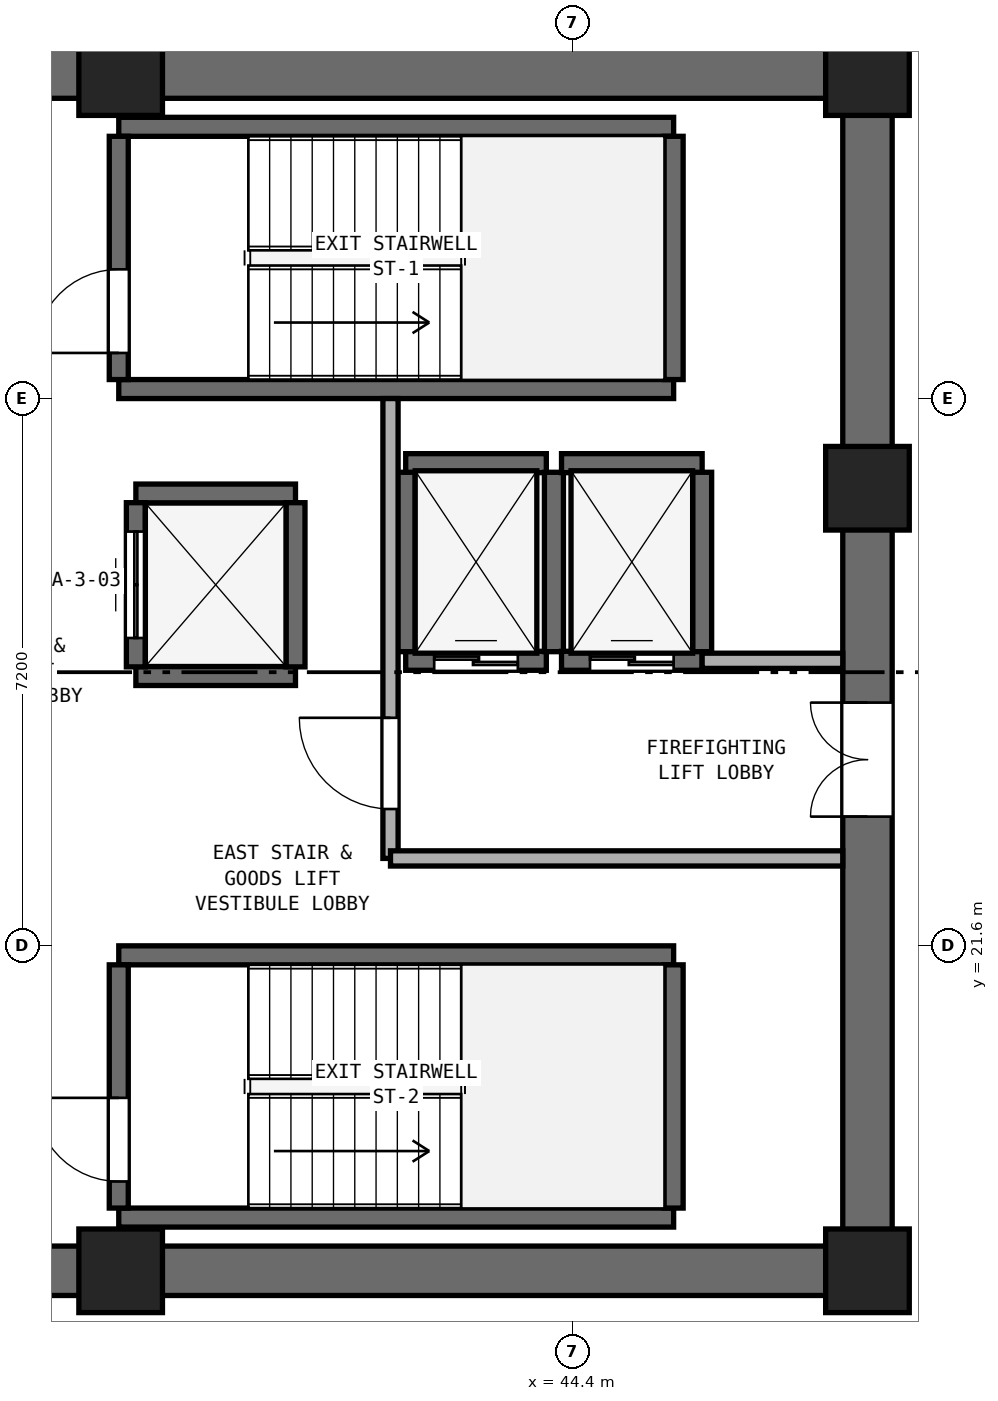
"""IFC4 building model, lengths in metres.
Left out: names, types, materials, properties, quantities, classifications, styles, units other than length and angle.
Written with IfcOpenShell. Run it as: python <this file> out.ifc"""

import sys

from ifc_helpers import new_model, si_unit, direction, frame, frame_2d, origin, origin_2d, place, context, subcontext, project, spatial, rectangle, extrude, element, fill, save


model = new_model("IFC4")
c1 = context("Model", 3, precision=1e-05, world=origin(), true_north=direction((0.0, 1.0)))
c2 = subcontext(c1, "Body", "Model", "MODEL_VIEW")
j1 = project(units=[si_unit("LENGTHUNIT", "METRE"), si_unit("PLANEANGLEUNIT", "RADIAN")], contexts=[c1])
p1 = place(None, origin())
s1 = spatial("IfcSite", under=j1, at=p1, CompositionType="ELEMENT")
p2 = place(p1, origin())
s2 = spatial("IfcBuilding", under=s1, at=p2, CompositionType="ELEMENT")
p3 = place(p2, frame((0.0, 0.0, 51.6)))
s3 = spatial("IfcBuildingStorey", under=s2, at=p3, CompositionType="ELEMENT", Elevation=51.6)
for number, where, z_axis, x_axis in (
    (1, (25.4, 17.325, 0.0), (0.0, 0.0, 1.0), (1.0, 0.0, 0.0)),
    (2, (25.4, 33.075, 0.0), (0.0, 0.0, 1.0), (1.0, 0.0, 0.0)),
):
    element("IfcWall", number, at=place(p3, frame(where, z_axis=z_axis, x_axis=x_axis)), inside=s3, PredefinedType="SHEAR", context=c2, shape_type="SweptSolid", body=[
        extrude(rectangle(XDim=23.2, YDim=0.65, at=frame_2d((11.6, 0.0))), origin(), (0.0, 0.0, 1.0), 3.525),
    ])
p4 = place(p3, frame((48.275, 17.65, 0.0), z_axis=(0.0, 0.0, 1.0), x_axis=(0.0, 1.0, 0.0)))
e3 = element("IfcWall", 3, at=p4, inside=s3, PredefinedType="SHEAR", context=c2, shape_type="SweptSolid", body=[
    extrude(rectangle(XDim=15.1, YDim=0.65, at=frame_2d((7.55, 0.0))), origin(), (0.0, 0.0, 1.0), 3.525),
])
p5 = place(p4, frame((5.65, 0.0, 0.0)))
e4 = element("IfcOpeningElement", 4, at=p5, cuts=e3, PredefinedType="OPENING", context=c2, shape_type="SweptSolid", body=[
    extrude(rectangle(XDim=1.5, YDim=2.15, at=frame_2d((0.75, 1.075))), frame((0.0, 0.335, 0.0), z_axis=(0.0, -1.0, 0.0), x_axis=(1.0, 0.0, 0.0)), (0.0, 0.0, 1.0), 0.67),
])
for number, where, z_axis, x_axis in (
    (5, (38.45, 17.325, 0.0), (0.0, 0.0, 1.0), (1.0, 0.0, 0.0)),
    (6, (48.275, 17.325, 0.0), (0.0, 0.0, 1.0), (1.0, 0.0, 0.0)),
    (7, (48.275, 27.62, 0.0), (0.0, 0.0, 1.0), (1.0, 0.0, 0.0)),
    (8, (48.275, 33.075, 0.0), (0.0, 0.0, 1.0), (1.0, 0.0, 0.0)),
    (9, (38.45, 33.075, 0.0), (0.0, 0.0, 1.0), (1.0, 0.0, 0.0)),
):
    element("IfcColumn", number, at=place(p3, frame(where, z_axis=z_axis, x_axis=x_axis)), inside=s3, PredefinedType="PILASTER", context=c2, shape_type="SweptSolid", body=[
        extrude(rectangle(XDim=1.1, YDim=1.1, at=origin_2d()), origin(), (0.0, 0.0, 1.0), 3.8),
    ])
for number, where, z_axis, x_axis in (
    (10, (38.425, 28.925, 0.0), (0.0, 0.0, 1.0), (1.0, 0.0, 0.0)),
    (11, (38.425, 32.375, 0.0), (0.0, 0.0, 1.0), (1.0, 0.0, 0.0)),
):
    element("IfcWall", number, at=place(p3, frame(where, z_axis=z_axis, x_axis=x_axis)), inside=s3, PredefinedType="SHEAR", context=c2, shape_type="SweptSolid", body=[
        extrude(rectangle(XDim=7.3, YDim=0.25, at=frame_2d((3.65, 0.0))), origin(), (0.0, 0.0, 1.0), 3.525),
    ])
p6 = place(p3, frame((38.425, 29.05, 0.0), z_axis=(0.0, 0.0, 1.0), x_axis=(0.0, 1.0, 0.0)))
e12 = element("IfcWall", 12, at=p6, inside=s3, PredefinedType="SHEAR", context=c2, shape_type="SweptSolid", body=[
    extrude(rectangle(XDim=3.2, YDim=0.25, at=frame_2d((1.6, 0.0))), origin(), (0.0, 0.0, 1.0), 3.525),
])
p7 = place(p6, frame((0.35, 0.0, 0.0)))
e13 = element("IfcOpeningElement", 13, at=p7, cuts=e12, PredefinedType="OPENING", context=c2, shape_type="SweptSolid", body=[
    extrude(rectangle(XDim=1.1, YDim=2.15, at=frame_2d((0.55, 1.075))), frame((0.0, 0.135, 0.0), z_axis=(0.0, -1.0, 0.0), x_axis=(1.0, 0.0, 0.0)), (0.0, 0.0, 1.0), 0.27),
])
p8 = place(p3, frame((45.725, 29.05, 0.0), z_axis=(0.0, 0.0, 1.0), x_axis=(0.0, 1.0, 0.0)))
e14 = element("IfcWall", 14, at=p8, inside=s3, PredefinedType="SHEAR", context=c2, shape_type="SweptSolid", body=[
    extrude(rectangle(XDim=3.2, YDim=0.25, at=frame_2d((1.6, 0.0))), origin(), (0.0, 0.0, 1.0), 3.525),
])
for number, where, z_axis, x_axis in (
    (15, (38.425, 18.025, 0.0), (0.0, 0.0, 1.0), (1.0, 0.0, 0.0)),
    (16, (38.425, 21.475, 0.0), (0.0, 0.0, 1.0), (1.0, 0.0, 0.0)),
):
    element("IfcWall", number, at=place(p3, frame(where, z_axis=z_axis, x_axis=x_axis)), inside=s3, PredefinedType="SHEAR", context=c2, shape_type="SweptSolid", body=[
        extrude(rectangle(XDim=7.3, YDim=0.25, at=frame_2d((3.65, 0.0))), origin(), (0.0, 0.0, 1.0), 3.525),
    ])
p9 = place(p3, frame((38.425, 18.15, 0.0), z_axis=(0.0, 0.0, 1.0), x_axis=(0.0, 1.0, 0.0)))
e17 = element("IfcWall", 17, at=p9, inside=s3, PredefinedType="SHEAR", context=c2, shape_type="SweptSolid", body=[
    extrude(rectangle(XDim=3.2, YDim=0.25, at=frame_2d((1.6, 0.0))), origin(), (0.0, 0.0, 1.0), 3.525),
])
p10 = place(p9, frame((0.35, 0.0, 0.0)))
e18 = element("IfcOpeningElement", 18, at=p10, cuts=e17, PredefinedType="OPENING", context=c2, shape_type="SweptSolid", body=[
    extrude(rectangle(XDim=1.1, YDim=2.15, at=frame_2d((0.55, 1.075))), frame((0.0, 0.135, 0.0), z_axis=(0.0, -1.0, 0.0), x_axis=(1.0, 0.0, 0.0)), (0.0, 0.0, 1.0), 0.27),
])
p11 = place(p3, frame((45.725, 18.15, 0.0), z_axis=(0.0, 0.0, 1.0), x_axis=(0.0, 1.0, 0.0)))
e19 = element("IfcWall", 19, at=p11, inside=s3, PredefinedType="SHEAR", context=c2, shape_type="SweptSolid", body=[
    extrude(rectangle(XDim=3.2, YDim=0.25, at=frame_2d((1.6, 0.0))), origin(), (0.0, 0.0, 1.0), 3.525),
])
p12 = place(p3, frame((42.2, 25.35, 0.0), z_axis=(0.0, 0.0, 1.0), x_axis=(1.0, 0.0, 0.0)))
e20 = element("IfcWall", 20, at=p12, inside=s3, PredefinedType="SHEAR", context=c2, shape_type="SweptSolid", body=[
    extrude(rectangle(XDim=1.85, YDim=0.25, at=frame_2d((0.925, 0.0))), origin(), (0.0, 0.0, 1.0), 3.525),
])
p13 = place(p12, frame((0.375, 0.0, 0.0)))
e21 = element("IfcOpeningElement", 21, at=p13, cuts=e20, PredefinedType="OPENING", context=c2, shape_type="SweptSolid", body=[
    extrude(rectangle(XDim=1.1, YDim=2.15, at=frame_2d((0.55, 1.075))), frame((0.0, 0.135, 0.0), z_axis=(0.0, -1.0, 0.0), x_axis=(1.0, 0.0, 0.0)), (0.0, 0.0, 1.0), 0.27),
])
p14 = place(p3, frame((42.2, 27.95, 0.0), z_axis=(0.0, 0.0, 1.0), x_axis=(1.0, 0.0, 0.0)))
e22 = element("IfcWall", 22, at=p14, inside=s3, PredefinedType="SHEAR", context=c2, shape_type="SweptSolid", body=[
    extrude(rectangle(XDim=1.85, YDim=0.25, at=frame_2d((0.925, 0.0))), origin(), (0.0, 0.0, 1.0), 3.525),
])
for number, where, z_axis, x_axis in (
    (23, (42.2, 25.47, 0.0), (0.0, 0.0, 1.0), (0.0, 1.0, 0.0)),
    (24, (44.15, 25.47, 0.0), (0.0, 0.0, 1.0), (0.0, 1.0, 0.0)),
):
    element("IfcWall", number, at=place(p3, frame(where, z_axis=z_axis, x_axis=x_axis)), inside=s3, PredefinedType="SHEAR", context=c2, shape_type="SweptSolid", body=[
        extrude(rectangle(XDim=2.36, YDim=0.25, at=frame_2d((1.18, 0.0))), origin(), (0.0, 0.0, 1.0), 3.525),
    ])
p15 = place(p3, frame((44.25, 25.35, 0.0), z_axis=(0.0, 0.0, 1.0), x_axis=(1.0, 0.0, 0.0)))
e25 = element("IfcWall", 25, at=p15, inside=s3, PredefinedType="SHEAR", context=c2, shape_type="SweptSolid", body=[
    extrude(rectangle(XDim=1.85, YDim=0.25, at=frame_2d((0.925, 0.0))), origin(), (0.0, 0.0, 1.0), 3.525),
])
p16 = place(p15, frame((0.375, 0.0, 0.0)))
e26 = element("IfcOpeningElement", 26, at=p16, cuts=e25, PredefinedType="OPENING", context=c2, shape_type="SweptSolid", body=[
    extrude(rectangle(XDim=1.1, YDim=2.15, at=frame_2d((0.55, 1.075))), frame((0.0, 0.135, 0.0), z_axis=(0.0, -1.0, 0.0), x_axis=(1.0, 0.0, 0.0)), (0.0, 0.0, 1.0), 0.27),
])
p17 = place(p3, frame((44.25, 27.95, 0.0), z_axis=(0.0, 0.0, 1.0), x_axis=(1.0, 0.0, 0.0)))
e27 = element("IfcWall", 27, at=p17, inside=s3, PredefinedType="SHEAR", context=c2, shape_type="SweptSolid", body=[
    extrude(rectangle(XDim=1.85, YDim=0.25, at=frame_2d((0.925, 0.0))), origin(), (0.0, 0.0, 1.0), 3.525),
])
p18 = place(p3, frame((46.1, 25.47, 0.0), z_axis=(0.0, 0.0, 1.0), x_axis=(0.0, 1.0, 0.0)))
e28 = element("IfcWall", 28, at=p18, inside=s3, PredefinedType="SHEAR", context=c2, shape_type="SweptSolid", body=[
    extrude(rectangle(XDim=2.36, YDim=0.25, at=frame_2d((1.18, 0.0))), origin(), (0.0, 0.0, 1.0), 3.525),
])
for number, where, z_axis, x_axis in (
    (29, (38.65, 25.15, 0.0), (0.0, 0.0, 1.0), (1.0, 0.0, 0.0)),
    (30, (38.65, 27.55, 0.0), (0.0, 0.0, 1.0), (1.0, 0.0, 0.0)),
):
    element("IfcWall", number, at=place(p3, frame(where, z_axis=z_axis, x_axis=x_axis)), inside=s3, PredefinedType="SHEAR", context=c2, shape_type="SweptSolid", body=[
        extrude(rectangle(XDim=2.1, YDim=0.25, at=frame_2d((1.05, 0.0))), origin(), (0.0, 0.0, 1.0), 3.525),
    ])
p19 = place(p3, frame((38.65, 25.27, 0.0), z_axis=(0.0, 0.0, 1.0), x_axis=(0.0, 1.0, 0.0)))
e31 = element("IfcWall", 31, at=p19, inside=s3, PredefinedType="SHEAR", context=c2, shape_type="SweptSolid", body=[
    extrude(rectangle(XDim=2.16, YDim=0.25, at=frame_2d((1.08, 0.0))), origin(), (0.0, 0.0, 1.0), 3.525),
])
p20 = place(p19, frame((0.38, 0.0, 0.0)))
e32 = element("IfcOpeningElement", 32, at=p20, cuts=e31, PredefinedType="OPENING", context=c2, shape_type="SweptSolid", body=[
    extrude(rectangle(XDim=1.4, YDim=2.2, at=frame_2d((0.7, 1.1))), frame((0.0, 0.135, 0.0), z_axis=(0.0, -1.0, 0.0), x_axis=(1.0, 0.0, 0.0)), (0.0, 0.0, 1.0), 0.27),
])
p21 = place(p3, frame((40.75, 25.27, 0.0), z_axis=(0.0, 0.0, 1.0), x_axis=(0.0, 1.0, 0.0)))
e33 = element("IfcWall", 33, at=p21, inside=s3, PredefinedType="SHEAR", context=c2, shape_type="SweptSolid", body=[
    extrude(rectangle(XDim=2.16, YDim=0.25, at=frame_2d((1.08, 0.0))), origin(), (0.0, 0.0, 1.0), 3.525),
])
p22 = place(p3, frame((42.0, 22.75, 0.0), z_axis=(0.0, 0.0, 1.0), x_axis=(0.0, 1.0, 0.0)))
e34 = element("IfcWall", 34, at=p22, inside=s3, PredefinedType="SOLIDWALL", context=c2, shape_type="SweptSolid", body=[
    extrude(rectangle(XDim=6.05, YDim=0.2, at=frame_2d((3.025, 0.0))), origin(), (0.0, 0.0, 1.0), 3.525),
])
p23 = place(p22, frame((0.65, 0.0, 0.0)))
e35 = element("IfcOpeningElement", 35, at=p23, cuts=e34, PredefinedType="OPENING", context=c2, shape_type="SweptSolid", body=[
    extrude(rectangle(XDim=1.2, YDim=2.15, at=frame_2d((0.6, 1.075))), frame((0.0, 0.11, 0.0), z_axis=(0.0, -1.0, 0.0), x_axis=(1.0, 0.0, 0.0)), (0.0, 0.0, 1.0), 0.22),
])
p24 = place(p3, frame((42.0, 22.75, 0.0), z_axis=(0.0, 0.0, 1.0), x_axis=(1.0, 0.0, 0.0)))
e36 = element("IfcWall", 36, at=p24, inside=s3, PredefinedType="SOLIDWALL", context=c2, shape_type="SweptSolid", body=[
    extrude(rectangle(XDim=5.95, YDim=0.2, at=frame_2d((2.975, 0.0))), origin(), (0.0, 0.0, 1.0), 3.525),
])
p25 = place(p3, frame((46.1, 25.35, 0.0), z_axis=(0.0, 0.0, 1.0), x_axis=(1.0, 0.0, 0.0)))
e37 = element("IfcWall", 37, at=p25, inside=s3, PredefinedType="SOLIDWALL", context=c2, shape_type="SweptSolid", body=[
    extrude(rectangle(XDim=1.85, YDim=0.2, at=frame_2d((0.925, 0.0))), origin(), (0.0, 0.0, 1.0), 3.525),
])
p26 = place(p7, origin())
e38 = element("IfcDoor", 38, at=p26, inside=s3, OperationType="SINGLE_SWING_LEFT", PredefinedType="DOOR", context=c2, shape_type="SweptSolid", body=[
    extrude(rectangle(XDim=1.1, YDim=2.15, at=frame_2d((0.55, 1.075))), frame((0.0, 0.025, 0.0), z_axis=(0.0, -1.0, 0.0), x_axis=(1.0, 0.0, 0.0)), (0.0, 0.0, 1.0), 0.05),
])
fill(e13, e38)
p27 = place(p10, origin())
e39 = element("IfcDoor", 39, at=p27, inside=s3, OperationType="SINGLE_SWING_RIGHT", PredefinedType="DOOR", context=c2, shape_type="SweptSolid", body=[
    extrude(rectangle(XDim=1.1, YDim=2.15, at=frame_2d((0.55, 1.075))), frame((0.0, 0.025, 0.0), z_axis=(0.0, -1.0, 0.0), x_axis=(1.0, 0.0, 0.0)), (0.0, 0.0, 1.0), 0.05),
])
fill(e18, e39)
p28 = place(p13, origin())
e40 = element("IfcDoor", 40, at=p28, inside=s3, OperationType="DOUBLE_DOOR_SLIDING", PredefinedType="DOOR", context=c2, shape_type="SweptSolid", body=[
    extrude(rectangle(XDim=1.1, YDim=2.15, at=frame_2d((0.55, 1.075))), frame((0.0, 0.025, 0.0), z_axis=(0.0, -1.0, 0.0), x_axis=(1.0, 0.0, 0.0)), (0.0, 0.0, 1.0), 0.05),
])
fill(e21, e40)
p29 = place(p16, origin())
e41 = element("IfcDoor", 41, at=p29, inside=s3, OperationType="DOUBLE_DOOR_SLIDING", PredefinedType="DOOR", context=c2, shape_type="SweptSolid", body=[
    extrude(rectangle(XDim=1.1, YDim=2.15, at=frame_2d((0.55, 1.075))), frame((0.0, 0.025, 0.0), z_axis=(0.0, -1.0, 0.0), x_axis=(1.0, 0.0, 0.0)), (0.0, 0.0, 1.0), 0.05),
])
fill(e26, e41)
p30 = place(p20, origin())
e42 = element("IfcDoor", 42, at=p30, inside=s3, OperationType="DOUBLE_DOOR_SLIDING", PredefinedType="DOOR", context=c2, shape_type="SweptSolid", body=[
    extrude(rectangle(XDim=1.4, YDim=2.2, at=frame_2d((0.7, 1.1))), frame((0.0, 0.025, 0.0), z_axis=(0.0, -1.0, 0.0), x_axis=(1.0, 0.0, 0.0)), (0.0, 0.0, 1.0), 0.05),
])
fill(e32, e42)
p31 = place(p23, origin())
e43 = element("IfcDoor", 43, at=p31, inside=s3, OperationType="SINGLE_SWING_RIGHT", PredefinedType="DOOR", context=c2, shape_type="SweptSolid", body=[
    extrude(rectangle(XDim=1.2, YDim=2.15, at=frame_2d((0.6, 1.075))), frame((0.0, 0.025, 0.0), z_axis=(0.0, -1.0, 0.0), x_axis=(1.0, 0.0, 0.0)), (0.0, 0.0, 1.0), 0.05),
])
fill(e35, e43)
p32 = place(p5, origin())
e44 = element("IfcDoor", 44, at=p32, inside=s3, OperationType="DOUBLE_DOOR_SINGLE_SWING", PredefinedType="DOOR", context=c2, shape_type="SweptSolid", body=[
    extrude(rectangle(XDim=1.5, YDim=2.15, at=frame_2d((0.75, 1.075))), frame((0.0, 0.025, 0.0), z_axis=(0.0, -1.0, 0.0), x_axis=(1.0, 0.0, 0.0)), (0.0, 0.0, 1.0), 0.05),
])
fill(e4, e44)
save(model, sys.argv[1])
